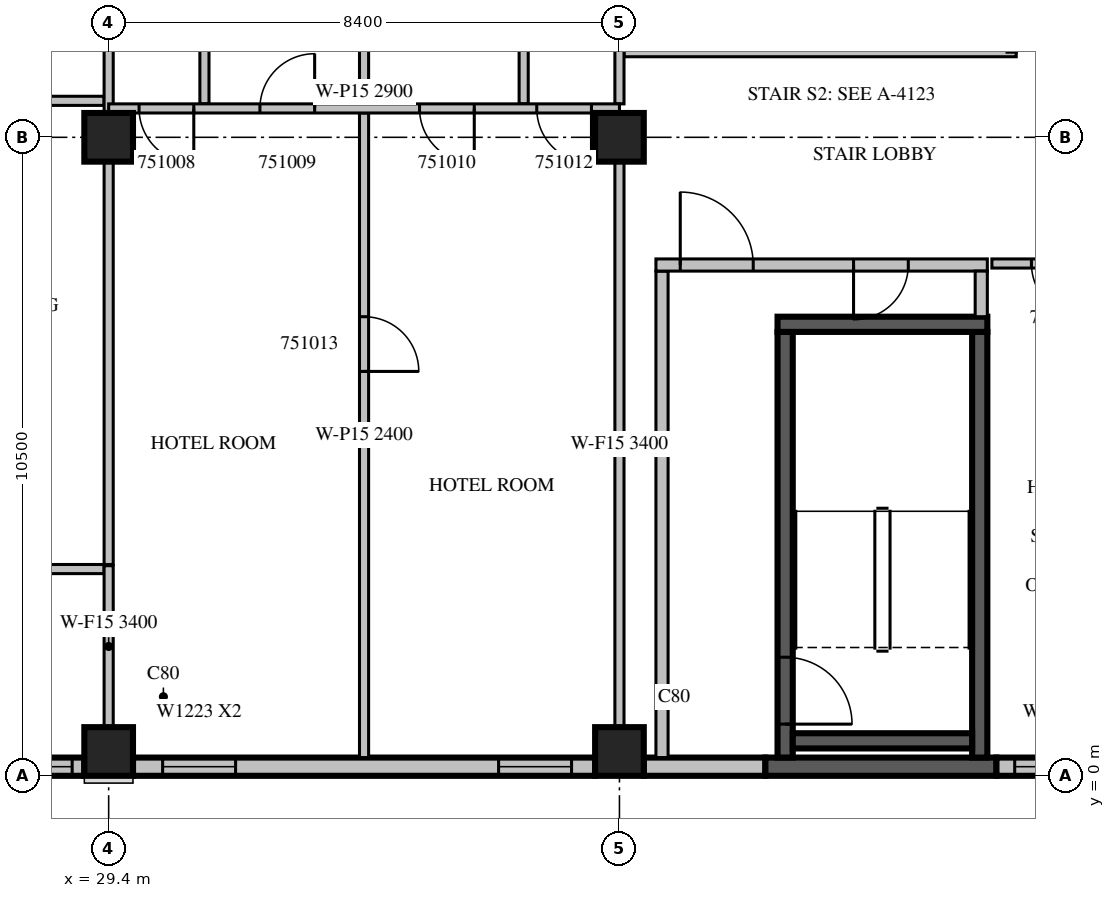
"""IFC4 building model, lengths in metres.
Left out: names, types, materials, properties, quantities, classifications, styles, units other than length and angle.
Written with IfcOpenShell. Run it as: python <this file> out.ifc"""

import sys

from ifc_helpers import new_model, si_unit, direction, frame, frame_2d, origin, origin_2d, place, context, subcontext, project, spatial, rectangle, extrude, source, transform, mapped, element, fill, save


model = new_model("IFC4")
c1 = context("Model", 3, precision=1e-05, world=origin(), true_north=direction((0.0, 1.0)))
c2 = subcontext(c1, "Body", "Model", "MODEL_VIEW")
j1 = project(units=[si_unit("LENGTHUNIT", "METRE"), si_unit("PLANEANGLEUNIT", "RADIAN")], contexts=[c1])
p1 = place(None, origin())
s1 = spatial("IfcSite", under=j1, at=p1, CompositionType="ELEMENT")
p2 = place(p1, origin())
s2 = spatial("IfcBuilding", under=s1, at=p2, CompositionType="ELEMENT")
p3 = place(p2, frame((0.0, 0.0, 227.2)))
s3 = spatial("IfcBuildingStorey", under=s2, at=p3, CompositionType="ELEMENT", Elevation=227.2)
m1 = source(origin(), c2, "Body", "SweptSolid", [
    extrude(rectangle(XDim=0.8, YDim=0.8, at=origin_2d()), origin(), (0.0, 0.0, 1.0), 3.8),
])
for number, where, z_axis, x_axis in (
    (1, (29.4, 0.4, 0.0), (0.0, 0.0, 1.0), (1.0, 0.0, 0.0)),
    (2, (37.8, 0.4, 0.0), (0.0, 0.0, 1.0), (1.0, 0.0, 0.0)),
    (3, (29.4, 10.5, 0.0), (0.0, 0.0, 1.0), (1.0, 0.0, 0.0)),
    (4, (37.8, 10.5, 0.0), (0.0, 0.0, 1.0), (1.0, 0.0, 0.0)),
):
    element("IfcColumn", number, at=place(p3, frame(where, z_axis=z_axis, x_axis=x_axis)), inside=s3, PredefinedType="COLUMN", context=c2, shape_type="MappedRepresentation", body=[
        mapped(m1, transform((0.0, 0.0, 0.0), scale=1.0)),
    ])
p4 = place(p3, frame((21.4, 0.15, 0.0), z_axis=(0.0, 0.0, 1.0), x_axis=(1.0, 0.0, 0.0)))
e5 = element("IfcWall", 5, at=p4, inside=s3, PredefinedType="STANDARD", context=c2, shape_type="SweptSolid", body=[
    extrude(rectangle(XDim=7.6, YDim=0.3, at=frame_2d((3.8, 0.0))), origin(), (0.0, 0.0, 1.0), 2.9),
])
m2 = source(origin(), c2, "Body", "SweptSolid", [
    extrude(rectangle(XDim=3.0, YDim=2.3, at=frame_2d((1.5, 1.15))), frame((0.0, 0.16, 0.0), z_axis=(0.0, -1.0, 0.0), x_axis=(1.0, 0.0, 0.0)), (0.0, 0.0, 1.0), 0.32),
])
p5 = place(p4, frame((0.2, 0.0, 0.6)))
e6 = element("IfcOpeningElement", 6, at=p5, cuts=e5, PredefinedType="OPENING", context=c2, shape_type="MappedRepresentation", body=[
    mapped(m2, transform((0.0, 0.0, 0.0), scale=1.0)),
])
p6 = place(p4, frame((4.4, 0.0, 0.6)))
e7 = element("IfcOpeningElement", 7, at=p6, cuts=e5, PredefinedType="OPENING", context=c2, shape_type="MappedRepresentation", body=[
    mapped(m2, transform((0.0, 0.0, 0.0), scale=1.0)),
])
p7 = place(p3, frame((29.8, 0.15, 0.0), z_axis=(0.0, 0.0, 1.0), x_axis=(1.0, 0.0, 0.0)))
e8 = element("IfcWall", 8, at=p7, inside=s3, PredefinedType="STANDARD", context=c2, shape_type="SweptSolid", body=[
    extrude(rectangle(XDim=7.6, YDim=0.3, at=frame_2d((3.8, 0.0))), origin(), (0.0, 0.0, 1.0), 3.4),
])
m3 = source(origin(), c2, "Body", "SweptSolid", [
    extrude(rectangle(XDim=1.2, YDim=2.3, at=frame_2d((0.6, 1.15))), frame((0.0, 0.16, 0.0), z_axis=(0.0, -1.0, 0.0), x_axis=(1.0, 0.0, 0.0)), (0.0, 0.0, 1.0), 0.32),
])
p8 = place(p7, frame((0.487, 0.0, 0.6)))
e9 = element("IfcOpeningElement", 9, at=p8, cuts=e8, PredefinedType="OPENING", context=c2, shape_type="MappedRepresentation", body=[
    mapped(m3, transform((0.0, 0.0, 0.0), scale=1.0)),
])
p9 = place(p7, frame((6.013, 0.0, 0.6)))
e10 = element("IfcOpeningElement", 10, at=p9, cuts=e8, PredefinedType="OPENING", context=c2, shape_type="MappedRepresentation", body=[
    mapped(m3, transform((0.0, 0.0, 0.0), scale=1.0)),
])
p10 = place(p3, frame((38.2, 0.15, 0.0), z_axis=(0.0, 0.0, 1.0), x_axis=(1.0, 0.0, 0.0)))
e11 = element("IfcWall", 11, at=p10, inside=s3, PredefinedType="STANDARD", context=c2, shape_type="SweptSolid", body=[
    extrude(rectangle(XDim=2.0, YDim=0.3, at=frame_2d((1.0, 0.0))), origin(), (0.0, 0.0, 1.0), 3.4),
])
m4 = source(origin(), c2, "Body", "SweptSolid", [
    extrude(rectangle(XDim=3.8, YDim=0.3, at=frame_2d((1.9, 0.0))), origin(), (0.0, 0.0, 1.0), 3.4),
])
p11 = place(p3, frame((40.2, 0.15, 0.0), z_axis=(0.0, 0.0, 1.0), x_axis=(1.0, 0.0, 0.0)))
e12 = element("IfcWall", 12, at=p11, inside=s3, PredefinedType="SOLIDWALL", context=c2, shape_type="MappedRepresentation", body=[
    mapped(m4, transform((0.0, 0.0, 0.0), scale=1.0)),
])
p12 = place(p3, frame((44.0, 0.15, 0.0), z_axis=(0.0, 0.0, 1.0), x_axis=(1.0, 0.0, 0.0)))
e13 = element("IfcWall", 13, at=p12, inside=s3, PredefinedType="STANDARD", context=c2, shape_type="SweptSolid", body=[
    extrude(rectangle(XDim=1.8, YDim=0.3, at=frame_2d((0.9, 0.0))), origin(), (0.0, 0.0, 1.0), 3.4),
])
p13 = place(p12, frame((0.3, 0.0, 0.6)))
e14 = element("IfcOpeningElement", 14, at=p13, cuts=e13, PredefinedType="OPENING", context=c2, shape_type="MappedRepresentation", body=[
    mapped(m3, transform((0.0, 0.0, 0.0), scale=1.0)),
])
m5 = source(origin(), c2, "Body", "SweptSolid", [
    extrude(rectangle(XDim=7.0, YDim=0.25, at=frame_2d((3.5, 0.0))), origin(), (0.0, 0.0, 1.0), 3.4),
])
p14 = place(p3, frame((40.525, 0.3, 0.0), z_axis=(0.0, 0.0, 1.0), x_axis=(0.0, 1.0, 0.0)))
e15 = element("IfcWall", 15, at=p14, inside=s3, PredefinedType="SOLIDWALL", context=c2, shape_type="MappedRepresentation", body=[
    mapped(m5, transform((0.0, 0.0, 0.0), scale=1.0)),
])
m6 = source(origin(), c2, "Body", "SweptSolid", [
    extrude(rectangle(XDim=1.1, YDim=2.1, at=frame_2d((0.55, 1.05))), frame((0.0, 0.135, 0.0), z_axis=(0.0, -1.0, 0.0), x_axis=(1.0, 0.0, 0.0)), (0.0, 0.0, 1.0), 0.27),
])
p15 = place(p14, frame((0.55, 0.0, 0.0)))
e16 = element("IfcOpeningElement", 16, at=p15, cuts=e15, PredefinedType="OPENING", context=c2, shape_type="MappedRepresentation", body=[
    mapped(m6, transform((0.0, 0.0, 0.0), scale=1.0)),
])
p16 = place(p3, frame((43.725, 0.3, 0.0), z_axis=(0.0, 0.0, 1.0), x_axis=(0.0, 1.0, 0.0)))
e17 = element("IfcWall", 17, at=p16, inside=s3, PredefinedType="SOLIDWALL", context=c2, shape_type="MappedRepresentation", body=[
    mapped(m5, transform((0.0, 0.0, 0.0), scale=1.0)),
])
m7 = source(origin(), c2, "Body", "SweptSolid", [
    extrude(rectangle(XDim=3.45, YDim=0.25, at=frame_2d((1.725, 0.0))), origin(), (0.0, 0.0, 1.0), 3.4),
])
p17 = place(p3, frame((40.4, 7.425, 0.0), z_axis=(0.0, 0.0, 1.0), x_axis=(1.0, 0.0, 0.0)))
e18 = element("IfcWall", 18, at=p17, inside=s3, PredefinedType="SOLIDWALL", context=c2, shape_type="MappedRepresentation", body=[
    mapped(m7, transform((0.0, 0.0, 0.0), scale=1.0)),
])
m8 = source(origin(), c2, "Body", "SweptSolid", [
    extrude(rectangle(XDim=2.95, YDim=0.25, at=frame_2d((1.475, 0.0))), origin(), (0.0, 0.0, 1.0), 3.4),
])
p18 = place(p3, frame((40.65, 0.575, 0.0), z_axis=(0.0, 0.0, 1.0), x_axis=(1.0, 0.0, 0.0)))
e19 = element("IfcWall", 19, at=p18, inside=s3, PredefinedType="SOLIDWALL", context=c2, shape_type="MappedRepresentation", body=[
    mapped(m8, transform((0.0, 0.0, 0.0), scale=1.0)),
])
m9 = source(origin(), c2, "Body", "SweptSolid", [
    extrude(rectangle(XDim=8.0, YDim=0.2, at=frame_2d((4.0, 0.0))), origin(), (0.0, 0.0, 1.0), 3.4),
])
p19 = place(p3, frame((38.5, 0.3, 0.0), z_axis=(0.0, 0.0, 1.0), x_axis=(0.0, 1.0, 0.0)))
e20 = element("IfcWall", 20, at=p19, inside=s3, PredefinedType="PARTITIONING", context=c2, shape_type="MappedRepresentation", body=[
    mapped(m9, transform((0.0, 0.0, 0.0), scale=1.0)),
])
m10 = source(origin(), c2, "Body", "SweptSolid", [
    extrude(rectangle(XDim=5.45, YDim=0.2, at=frame_2d((2.725, 0.0))), origin(), (0.0, 0.0, 1.0), 3.4),
])
p20 = place(p3, frame((38.4, 8.4, 0.0), z_axis=(0.0, 0.0, 1.0), x_axis=(1.0, 0.0, 0.0)))
e21 = element("IfcWall", 21, at=p20, inside=s3, PredefinedType="PARTITIONING", context=c2, shape_type="MappedRepresentation", body=[
    mapped(m10, transform((0.0, 0.0, 0.0), scale=1.0)),
])
m11 = source(origin(), c2, "Body", "SweptSolid", [
    extrude(rectangle(XDim=1.2, YDim=2.1, at=frame_2d((0.6, 1.05))), frame((0.0, 0.11, 0.0), z_axis=(0.0, -1.0, 0.0), x_axis=(1.0, 0.0, 0.0)), (0.0, 0.0, 1.0), 0.22),
])
p21 = place(p20, frame((0.4, 0.0, 0.0)))
e22 = element("IfcOpeningElement", 22, at=p21, cuts=e21, PredefinedType="OPENING", context=c2, shape_type="MappedRepresentation", body=[
    mapped(m11, transform((0.0, 0.0, 0.0), scale=1.0)),
])
m12 = source(origin(), c2, "Body", "SweptSolid", [
    extrude(rectangle(XDim=0.9, YDim=2.1, at=frame_2d((0.45, 1.05))), frame((0.0, 0.11, 0.0), z_axis=(0.0, -1.0, 0.0), x_axis=(1.0, 0.0, 0.0)), (0.0, 0.0, 1.0), 0.22),
])
p22 = place(p20, frame((3.25, 0.0, 0.0)))
e23 = element("IfcOpeningElement", 23, at=p22, cuts=e21, PredefinedType="OPENING", context=c2, shape_type="MappedRepresentation", body=[
    mapped(m12, transform((0.0, 0.0, 0.0), scale=1.0)),
])
m13 = source(origin(), c2, "Body", "SweptSolid", [
    extrude(rectangle(XDim=0.75, YDim=0.2, at=frame_2d((0.375, 0.0))), origin(), (0.0, 0.0, 1.0), 3.4),
])
p23 = place(p3, frame((43.75, 7.55, 0.0), z_axis=(0.0, 0.0, 1.0), x_axis=(0.0, 1.0, 0.0)))
e24 = element("IfcWall", 24, at=p23, inside=s3, PredefinedType="PARTITIONING", context=c2, shape_type="MappedRepresentation", body=[
    mapped(m13, transform((0.0, 0.0, 0.0), scale=1.0)),
])
m14 = source(origin(), c2, "Body", "SweptSolid", [
    extrude(rectangle(XDim=4.05, YDim=0.15, at=frame_2d((2.025, 0.0))), origin(), (0.0, 0.0, 1.0), 3.4),
])
p24 = place(p3, frame((29.325, 11.1, 0.0), z_axis=(0.0, 0.0, 1.0), x_axis=(-1.0, 0.0, 0.0)))
e25 = element("IfcWall", 25, at=p24, inside=s3, PredefinedType="PARTITIONING", context=c2, shape_type="MappedRepresentation", body=[
    mapped(m14, transform((0.0, 0.0, 0.0), scale=1.0)),
])
p25 = place(p3, frame((29.4, 3.475, 0.0), z_axis=(0.0, 0.0, 1.0), x_axis=(0.0, 1.0, 0.0)))
e26 = element("IfcWall", 26, at=p25, inside=s3, PredefinedType="PARTITIONING", context=c2, shape_type="SweptSolid", body=[
    extrude(rectangle(XDim=6.626, YDim=0.15, at=frame_2d((3.313, 0.0))), origin(), (0.0, 0.0, 1.0), 3.4),
])
p26 = place(p3, frame((29.4, 10.899, 0.0), z_axis=(0.0, 0.0, 1.0), x_axis=(0.0, 1.0, 0.0)))
e27 = element("IfcWall", 27, at=p26, inside=s3, PredefinedType="PARTITIONING", context=c2, shape_type="SweptSolid", body=[
    extrude(rectangle(XDim=4.101, YDim=0.15, at=frame_2d((2.05, 0.0))), origin(), (0.0, 0.0, 1.0), 3.4),
])
m15 = source(origin(), c2, "Body", "SweptSolid", [
    extrude(rectangle(XDim=7.525, YDim=0.15, at=frame_2d((3.763, 0.0))), origin(), (0.0, 0.0, 1.0), 2.9),
])
p27 = place(p3, frame((21.8, 3.4, 0.0), z_axis=(0.0, 0.0, 1.0), x_axis=(1.0, 0.0, 0.0)))
e28 = element("IfcWall", 28, at=p27, inside=s3, PredefinedType="PARTITIONING", context=c2, shape_type="MappedRepresentation", body=[
    mapped(m15, transform((0.0, 0.0, 0.0), scale=1.0)),
])
m16 = source(origin(), c2, "Body", "SweptSolid", [
    extrude(rectangle(XDim=1.0, YDim=2.1, at=frame_2d((0.5, 1.05))), frame((0.0, 0.085, 0.0), z_axis=(0.0, -1.0, 0.0), x_axis=(1.0, 0.0, 0.0)), (0.0, 0.0, 1.0), 0.17),
])
p28 = place(p27, frame((3.6, 0.0, 0.0)))
e29 = element("IfcOpeningElement", 29, at=p28, cuts=e28, PredefinedType="OPENING", context=c2, shape_type="MappedRepresentation", body=[
    mapped(m16, transform((0.0, 0.0, 0.0), scale=1.0)),
])
m17 = source(origin(), c2, "Body", "SweptSolid", [
    extrude(rectangle(XDim=0.9, YDim=2.1, at=frame_2d((0.45, 1.05))), frame((0.0, 0.085, 0.0), z_axis=(0.0, -1.0, 0.0), x_axis=(1.0, 0.0, 0.0)), (0.0, 0.0, 1.0), 0.17),
])
p29 = place(p27, frame((2.312, 0.0, 0.0)))
e30 = element("IfcOpeningElement", 30, at=p29, cuts=e28, PredefinedType="OPENING", context=c2, shape_type="MappedRepresentation", body=[
    mapped(m17, transform((0.0, 0.0, 0.0), scale=1.0)),
])
m18 = source(origin(), c2, "Body", "SweptSolid", [
    extrude(rectangle(XDim=6.45, YDim=0.15, at=frame_2d((3.225, 0.0))), origin(), (0.0, 0.0, 1.0), 3.4),
])
p30 = place(p3, frame((37.875, 11.9, 0.0), z_axis=(0.0, 0.0, 1.0), x_axis=(1.0, 0.0, 0.0)))
e31 = element("IfcWall", 31, at=p30, inside=s3, PredefinedType="PARTITIONING", context=c2, shape_type="MappedRepresentation", body=[
    mapped(m18, transform((0.0, 0.0, 0.0), scale=1.0)),
])
m19 = source(origin(), c2, "Body", "SweptSolid", [
    extrude(rectangle(XDim=2.2, YDim=0.15, at=frame_2d((1.1, 0.0))), origin(), (0.0, 0.0, 1.0), 3.4),
])
p31 = place(p3, frame((46.125, 8.425, 0.0), z_axis=(0.0, 0.0, 1.0), x_axis=(-1.0, 0.0, 0.0)))
e32 = element("IfcWall", 32, at=p31, inside=s3, PredefinedType="PARTITIONING", context=c2, shape_type="MappedRepresentation", body=[
    mapped(m19, transform((0.0, 0.0, 0.0), scale=1.0)),
])
p32 = place(p31, frame((0.65, 0.0, 0.0)))
e33 = element("IfcOpeningElement", 33, at=p32, cuts=e32, PredefinedType="OPENING", context=c2, shape_type="MappedRepresentation", body=[
    mapped(m17, transform((0.0, 0.0, 0.0), scale=1.0)),
])
p33 = place(p3, frame((33.6, 0.3, 0.0), z_axis=(0.0, 0.0, 1.0), x_axis=(0.0, 1.0, 0.0)))
e34 = element("IfcWall", 34, at=p33, inside=s3, PredefinedType="PARTITIONING", context=c2, shape_type="SweptSolid", body=[
    extrude(rectangle(XDim=10.6, YDim=0.15, at=frame_2d((5.3, 0.0))), origin(), (0.0, 0.0, 1.0), 2.4),
])
p34 = place(p33, frame((6.35, 0.0, 0.0)))
e35 = element("IfcOpeningElement", 35, at=p34, cuts=e34, PredefinedType="OPENING", context=c2, shape_type="MappedRepresentation", body=[
    mapped(m17, transform((0.0, 0.0, 0.0), scale=1.0)),
])
p35 = place(p3, frame((30.975, 11.05, 0.0), z_axis=(0.0, 0.0, 1.0), x_axis=(0.0, 1.0, 0.0)))
e36 = element("IfcWall", 36, at=p35, inside=s3, PredefinedType="PARTITIONING", context=c2, shape_type="SweptSolid", body=[
    extrude(rectangle(XDim=3.95, YDim=0.15, at=frame_2d((1.975, 0.0))), origin(), (0.0, 0.0, 1.0), 3.4),
])
p36 = place(p3, frame((33.6, 11.05, 0.0), z_axis=(0.0, 0.0, 1.0), x_axis=(0.0, 1.0, 0.0)))
e37 = element("IfcWall", 37, at=p36, inside=s3, PredefinedType="PARTITIONING", context=c2, shape_type="SweptSolid", body=[
    extrude(rectangle(XDim=3.95, YDim=0.15, at=frame_2d((1.975, 0.0))), origin(), (0.0, 0.0, 1.0), 2.9),
])
m20 = source(origin(), c2, "Body", "SweptSolid", [
    extrude(rectangle(XDim=3.95, YDim=0.15, at=frame_2d((1.975, 0.0))), origin(), (0.0, 0.0, 1.0), 3.4),
])
p37 = place(p3, frame((36.225, 11.05, 0.0), z_axis=(0.0, 0.0, 1.0), x_axis=(0.0, 1.0, 0.0)))
e38 = element("IfcWall", 38, at=p37, inside=s3, PredefinedType="PARTITIONING", context=c2, shape_type="MappedRepresentation", body=[
    mapped(m20, transform((0.0, 0.0, 0.0), scale=1.0)),
])
p38 = place(p3, frame((29.4, 0.799, 0.0), z_axis=(0.0, 0.0, 1.0), x_axis=(0.0, 1.0, 0.0)))
e39 = element("IfcWall", 39, at=p38, inside=s3, PredefinedType="PARTITIONING", context=c2, shape_type="SweptSolid", body=[
    extrude(rectangle(XDim=2.656, YDim=0.15, at=frame_2d((1.328, 0.0))), origin(), (0.0, 0.0, 1.0), 3.4),
])
p39 = place(p3, frame((37.8, 0.799, 0.0), z_axis=(0.0, 0.0, 1.0), x_axis=(0.0, 1.0, 0.0)))
e40 = element("IfcWall", 40, at=p39, inside=s3, PredefinedType="PARTITIONING", context=c2, shape_type="SweptSolid", body=[
    extrude(rectangle(XDim=9.302, YDim=0.15, at=frame_2d((4.651, 0.0))), origin(), (0.0, 0.0, 1.0), 3.4),
])
p40 = place(p3, frame((37.8, 11.05, 0.0), z_axis=(0.0, 0.0, 1.0), x_axis=(0.0, 1.0, 0.0)))
e41 = element("IfcWall", 41, at=p40, inside=s3, PredefinedType="PARTITIONING", context=c2, shape_type="MappedRepresentation", body=[
    mapped(m20, transform((0.0, 0.0, 0.0), scale=1.0)),
])
m21 = source(origin(), c2, "Body", "SweptSolid", [
    extrude(rectangle(XDim=8.4, YDim=0.15, at=frame_2d((4.2, 0.0))), origin(), (0.0, 0.0, 1.0), 2.9),
])
p41 = place(p3, frame((37.8, 10.975, 0.0), z_axis=(0.0, 0.0, 1.0), x_axis=(-1.0, 0.0, 0.0)))
e42 = element("IfcWall", 42, at=p41, inside=s3, PredefinedType="PARTITIONING", context=c2, shape_type="MappedRepresentation", body=[
    mapped(m21, transform((0.0, 0.0, 0.0), scale=1.0)),
])
p42 = place(p41, frame((7.0, 0.0, 0.0)))
e43 = element("IfcOpeningElement", 43, at=p42, cuts=e42, PredefinedType="OPENING", context=c2, shape_type="MappedRepresentation", body=[
    mapped(m17, transform((0.0, 0.0, 0.0), scale=1.0)),
])
p43 = place(p41, frame((5.013, 0.0, 0.0)))
e44 = element("IfcOpeningElement", 44, at=p43, cuts=e42, PredefinedType="OPENING", context=c2, shape_type="MappedRepresentation", body=[
    mapped(m17, transform((0.0, 0.0, 0.0), scale=1.0)),
])
p44 = place(p41, frame((2.388, 0.0, 0.0)))
e45 = element("IfcOpeningElement", 45, at=p44, cuts=e42, PredefinedType="OPENING", context=c2, shape_type="MappedRepresentation", body=[
    mapped(m17, transform((0.0, 0.0, 0.0), scale=1.0)),
])
p45 = place(p41, frame((0.46, 0.0, 0.0)))
e46 = element("IfcOpeningElement", 46, at=p45, cuts=e42, PredefinedType="OPENING", context=c2, shape_type="MappedRepresentation", body=[
    mapped(m17, transform((0.0, 0.0, 0.0), scale=1.0)),
])
m22 = source(origin(), c2, "Body", "SweptSolid", [
    extrude(rectangle(XDim=3.0, YDim=2.3, at=frame_2d((1.5, 1.15))), frame((0.0, 0.03, 0.0), z_axis=(0.0, -1.0, 0.0), x_axis=(1.0, 0.0, 0.0)), (0.0, 0.0, 1.0), 0.06),
])
p46 = place(p6, origin())
e47 = element("IfcWindow", 47, at=p46, inside=s3, PartitioningType="SINGLE_PANEL", PredefinedType="WINDOW", context=c2, shape_type="MappedRepresentation", body=[
    mapped(m22, transform((0.0, 0.0, 0.0), scale=1.0)),
])
fill(e7, e47)
m23 = source(origin(), c2, "Body", "SweptSolid", [
    extrude(rectangle(XDim=1.2, YDim=2.3, at=frame_2d((0.6, 1.15))), frame((0.0, 0.03, 0.0), z_axis=(0.0, -1.0, 0.0), x_axis=(1.0, 0.0, 0.0)), (0.0, 0.0, 1.0), 0.06),
])
p47 = place(p8, origin())
e48 = element("IfcWindow", 48, at=p47, inside=s3, PartitioningType="SINGLE_PANEL", PredefinedType="WINDOW", context=c2, shape_type="MappedRepresentation", body=[
    mapped(m23, transform((0.0, 0.0, 0.0), scale=1.0)),
])
fill(e9, e48)
p48 = place(p9, origin())
e49 = element("IfcWindow", 49, at=p48, inside=s3, PartitioningType="SINGLE_PANEL", PredefinedType="WINDOW", context=c2, shape_type="MappedRepresentation", body=[
    mapped(m23, transform((0.0, 0.0, 0.0), scale=1.0)),
])
fill(e10, e49)
p49 = place(p13, origin())
e50 = element("IfcWindow", 50, at=p49, inside=s3, PartitioningType="SINGLE_PANEL", PredefinedType="WINDOW", context=c2, shape_type="MappedRepresentation", body=[
    mapped(m23, transform((0.0, 0.0, 0.0), scale=1.0)),
])
fill(e14, e50)
m24 = source(origin(), c2, "Body", "SweptSolid", [
    extrude(rectangle(XDim=1.1, YDim=2.1, at=frame_2d((0.55, 1.05))), frame((0.0, 0.025, 0.0), z_axis=(0.0, -1.0, 0.0), x_axis=(1.0, 0.0, 0.0)), (0.0, 0.0, 1.0), 0.05),
])
p50 = place(p15, origin())
e51 = element("IfcDoor", 51, at=p50, inside=s3, OperationType="SINGLE_SWING_RIGHT", PredefinedType="DOOR", context=c2, shape_type="MappedRepresentation", body=[
    mapped(m24, transform((0.0, 0.0, 0.0), scale=1.0)),
])
fill(e16, e51)
m25 = source(origin(), c2, "Body", "SweptSolid", [
    extrude(rectangle(XDim=1.2, YDim=2.1, at=frame_2d((0.6, 1.05))), frame((0.0, 0.025, 0.0), z_axis=(0.0, -1.0, 0.0), x_axis=(1.0, 0.0, 0.0)), (0.0, 0.0, 1.0), 0.05),
])
p51 = place(p21, origin())
e52 = element("IfcDoor", 52, at=p51, inside=s3, OperationType="SINGLE_SWING_LEFT", PredefinedType="DOOR", context=c2, shape_type="MappedRepresentation", body=[
    mapped(m25, transform((0.0, 0.0, 0.0), scale=1.0)),
])
fill(e22, e52)
m26 = source(origin(), c2, "Body", "SweptSolid", [
    extrude(rectangle(XDim=0.9, YDim=2.1, at=frame_2d((0.45, 1.05))), frame((0.0, 0.025, 0.0), z_axis=(0.0, -1.0, 0.0), x_axis=(1.0, 0.0, 0.0)), (0.0, 0.0, 1.0), 0.05),
])
p52 = place(p22, origin())
e53 = element("IfcDoor", 53, at=p52, inside=s3, OperationType="SINGLE_SWING_RIGHT", PredefinedType="DOOR", context=c2, shape_type="MappedRepresentation", body=[
    mapped(m26, transform((0.0, 0.0, 0.0), scale=1.0)),
])
fill(e23, e53)
p53 = place(p32, origin())
e54 = element("IfcDoor", 54, at=p53, inside=s3, OperationType="SINGLE_SWING_LEFT", PredefinedType="DOOR", context=c2, shape_type="MappedRepresentation", body=[
    mapped(m26, transform((0.0, 0.0, 0.0), scale=1.0)),
])
fill(e33, e54)
p54 = place(p42, origin())
e55 = element("IfcDoor", 55, at=p54, inside=s3, OperationType="SINGLE_SWING_LEFT", PredefinedType="DOOR", context=c2, shape_type="MappedRepresentation", body=[
    mapped(m26, transform((0.0, 0.0, 0.0), scale=1.0)),
])
fill(e43, e55)
p55 = place(p43, origin())
e56 = element("IfcDoor", 56, at=p55, inside=s3, OperationType="SINGLE_SWING_RIGHT", PredefinedType="DOOR", context=c2, shape_type="MappedRepresentation", body=[
    mapped(m26, transform((0.0, 0.0, 0.0), scale=1.0)),
])
fill(e44, e56)
p56 = place(p44, origin())
e57 = element("IfcDoor", 57, at=p56, inside=s3, OperationType="SINGLE_SWING_LEFT", PredefinedType="DOOR", context=c2, shape_type="MappedRepresentation", body=[
    mapped(m26, transform((0.0, 0.0, 0.0), scale=1.0)),
])
fill(e45, e57)
p57 = place(p45, origin())
e58 = element("IfcDoor", 58, at=p57, inside=s3, OperationType="SINGLE_SWING_LEFT", PredefinedType="DOOR", context=c2, shape_type="MappedRepresentation", body=[
    mapped(m26, transform((0.0, 0.0, 0.0), scale=1.0)),
])
fill(e46, e58)
p58 = place(p34, origin())
e59 = element("IfcDoor", 59, at=p58, inside=s3, OperationType="SINGLE_SWING_RIGHT", PredefinedType="DOOR", context=c2, shape_type="MappedRepresentation", body=[
    mapped(m26, transform((0.0, 0.0, 0.0), scale=1.0)),
])
fill(e35, e59)
save(model, sys.argv[1])
